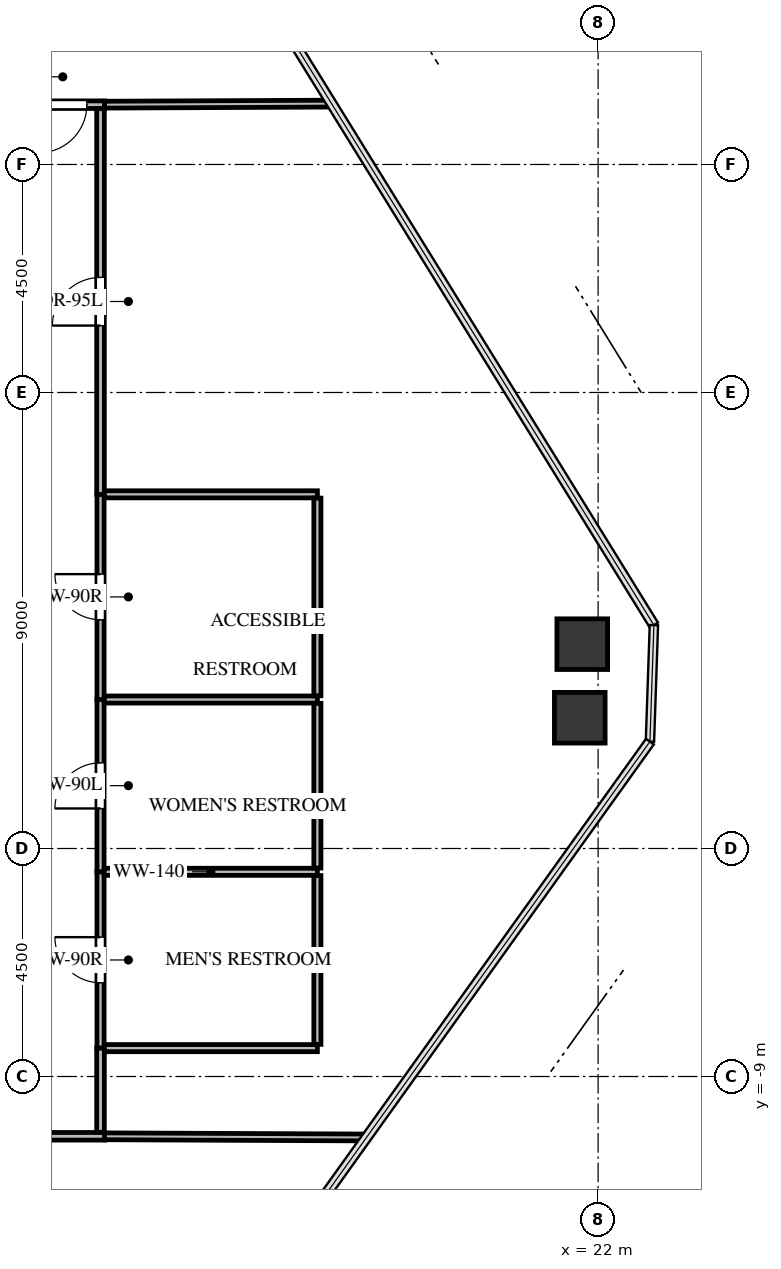
"""IFC4 building model, lengths in metres.
Left out: names, types, materials, properties, quantities, classifications, styles, units other than length and angle.
Written with IfcOpenShell. Run it as: python <this file> out.ifc"""

import sys

from ifc_helpers import new_model, si_unit, direction, frame, frame_2d, origin, origin_2d, place, context, subcontext, project, spatial, rectangle, extrude, source, transform, mapped, element, fill, save


model = new_model("IFC4")
c1 = context("Model", 3, precision=1e-05, world=origin(), true_north=direction((0.0, 1.0)))
c2 = subcontext(c1, "Body", "Model", "MODEL_VIEW")
j1 = project(units=[si_unit("LENGTHUNIT", "METRE"), si_unit("PLANEANGLEUNIT", "RADIAN")], contexts=[c1])
p1 = place(None, origin())
s1 = spatial("IfcSite", under=j1, at=p1, CompositionType="ELEMENT")
p2 = place(p1, origin())
s2 = spatial("IfcBuilding", under=s1, at=p2, CompositionType="ELEMENT")
p3 = place(p2, frame((0.0, 0.0, 183.7)))
s3 = spatial("IfcBuildingStorey", under=s2, at=p3, CompositionType="ELEMENT", Elevation=183.7)
m1 = source(origin(), c2, "Body", "SweptSolid", [
    extrude(rectangle(XDim=1.0, YDim=1.0, at=origin_2d()), origin(), (0.0, 0.0, 1.0), 3.3),
])
for number, where, z_axis, x_axis in (
    (1, (21.687, -0.467, -0.24), (0.0, 0.0, 1.0), (1.0, 0.0, 0.0)),
    (2, (21.638, -1.92, -0.24), (0.0, 0.0, 1.0), (1.0, 0.0, 0.0)),
):
    element("IfcColumn", number, at=place(p3, frame(where, z_axis=z_axis, x_axis=x_axis)), inside=s3, PredefinedType="COLUMN", context=c2, shape_type="MappedRepresentation", body=[
        mapped(m1, transform((0.0, 0.0, 0.0), x_axis=(1.0, 0.0, 0.0), y_axis=(0.0, 1.0, 0.0), z_axis=(0.0, 0.0, 1.0), scale=1.0)),
    ])
p4 = place(p3, frame((12.18, -8.44, 0.0), z_axis=(0.0, 0.0, 1.0), x_axis=(0.0, 1.0, 0.0)))
e3 = element("IfcWall", 3, at=p4, inside=s3, PredefinedType="PARTITIONING", context=c2, shape_type="SweptSolid", body=[
    extrude(rectangle(XDim=3.48, YDim=0.14, at=frame_2d((1.74, 0.0))), origin(), (0.0, 0.0, 1.0), 3.045),
])
p5 = place(p4, frame((1.29, 0.0, 0.0)))
e4 = element("IfcOpeningElement", 4, at=p5, cuts=e3, PredefinedType="OPENING", context=c2, shape_type="SweptSolid", body=[
    extrude(rectangle(XDim=0.9, YDim=2.05, at=frame_2d((0.45, 1.025))), frame((0.0, 0.08, 0.0), z_axis=(0.0, -1.0, 0.0), x_axis=(1.0, 0.0, 0.0)), (0.0, 0.0, 1.0), 0.16),
])
p6 = place(p3, frame((12.18, -4.96, 0.0), z_axis=(0.0, 0.0, 1.0), x_axis=(0.0, 1.0, 0.0)))
e5 = element("IfcWall", 5, at=p6, inside=s3, PredefinedType="PARTITIONING", context=c2, shape_type="SweptSolid", body=[
    extrude(rectangle(XDim=3.4, YDim=0.14, at=frame_2d((1.7, 0.0))), origin(), (0.0, 0.0, 1.0), 3.045),
])
p7 = place(p6, frame((1.25, 0.0, 0.0)))
e6 = element("IfcOpeningElement", 6, at=p7, cuts=e5, PredefinedType="OPENING", context=c2, shape_type="SweptSolid", body=[
    extrude(rectangle(XDim=0.9, YDim=2.05, at=frame_2d((0.45, 1.025))), frame((0.0, 0.08, 0.0), z_axis=(0.0, -1.0, 0.0), x_axis=(1.0, 0.0, 0.0)), (0.0, 0.0, 1.0), 0.16),
])
p8 = place(p3, frame((12.18, -1.56, 0.0), z_axis=(0.0, 0.0, 1.0), x_axis=(0.0, 1.0, 0.0)))
e7 = element("IfcWall", 7, at=p8, inside=s3, PredefinedType="PARTITIONING", context=c2, shape_type="SweptSolid", body=[
    extrude(rectangle(XDim=4.05, YDim=0.14, at=frame_2d((2.025, 0.0))), origin(), (0.0, 0.0, 1.0), 2.242),
])
p9 = place(p8, frame((1.575, 0.0, 0.0)))
e8 = element("IfcOpeningElement", 8, at=p9, cuts=e7, PredefinedType="OPENING", context=c2, shape_type="SweptSolid", body=[
    extrude(rectangle(XDim=0.9, YDim=2.05, at=frame_2d((0.45, 1.025))), frame((0.0, 0.08, 0.0), z_axis=(0.0, -1.0, 0.0), x_axis=(1.0, 0.0, 0.0)), (0.0, 0.0, 1.0), 0.16),
])
p10 = place(p3, frame((12.26, 10.18, 0.0), z_axis=(0.0, 0.0, 1.0), x_axis=(-1.0, 0.0, 0.0)))
e9 = element("IfcWall", 9, at=p10, inside=s3, PredefinedType="PARTITIONING", context=c2, shape_type="SweptSolid", body=[
    extrude(rectangle(XDim=6.72, YDim=0.15, at=frame_2d((3.36, 0.0))), origin(), (0.0, 0.0, 1.0), 2.242),
])
p11 = place(p10, frame((0.35, 0.0, 0.0)))
e10 = element("IfcOpeningElement", 10, at=p11, cuts=e9, PredefinedType="OPENING", context=c2, shape_type="SweptSolid", body=[
    extrude(rectangle(XDim=0.95, YDim=2.1, at=frame_2d((0.475, 1.05))), frame((0.0, 0.085, 0.0), z_axis=(0.0, -1.0, 0.0), x_axis=(1.0, 0.0, 0.0)), (0.0, 0.0, 1.0), 0.17),
])
p12 = place(p3, frame((4.04, -10.18, 0.0), z_axis=(0.0, 0.0, 1.0), x_axis=(1.0, 0.0, 0.0)))
e11 = element("IfcWall", 11, at=p12, inside=s3, PredefinedType="PARTITIONING", context=c2, shape_type="SweptSolid", body=[
    extrude(rectangle(XDim=8.22, YDim=0.15, at=frame_2d((4.11, 0.0))), origin(), (0.0, 0.0, 1.0), 2.242),
])
p13 = place(p12, frame((3.65, 0.0, 0.0)))
e12 = element("IfcOpeningElement", 12, at=p13, cuts=e11, PredefinedType="OPENING", context=c2, shape_type="SweptSolid", body=[
    extrude(rectangle(XDim=0.92, YDim=2.1, at=frame_2d((0.46, 1.05))), frame((0.0, 0.085, 0.0), z_axis=(0.0, -1.0, 0.0), x_axis=(1.0, 0.0, 0.0)), (0.0, 0.0, 1.0), 0.17),
])
p14 = place(p3, frame((12.18, 2.49, 0.0), z_axis=(0.0, 0.0, 1.0), x_axis=(0.0, 1.0, 0.0)))
e13 = element("IfcWall", 13, at=p14, inside=s3, PredefinedType="PARTITIONING", context=c2, shape_type="SweptSolid", body=[
    extrude(rectangle(XDim=7.611, YDim=0.15, at=frame_2d((3.806, 0.0))), origin(), (0.0, 0.0, 1.0), 3.045),
])
p15 = place(p14, frame((3.331, 0.0, 0.0)))
e14 = element("IfcOpeningElement", 14, at=p15, cuts=e13, PredefinedType="OPENING", context=c2, shape_type="SweptSolid", body=[
    extrude(rectangle(XDim=0.95, YDim=2.1, at=frame_2d((0.475, 1.05))), frame((0.0, 0.085, 0.0), z_axis=(0.0, -1.0, 0.0), x_axis=(1.0, 0.0, 0.0)), (0.0, 0.0, 1.0), 0.17),
])
p16 = place(p3, frame((12.18, -10.101, 0.0), z_axis=(0.0, 0.0, 1.0), x_axis=(0.0, 1.0, 0.0)))
e15 = element("IfcWall", 15, at=p16, inside=s3, PredefinedType="PARTITIONING", context=c2, shape_type="SweptSolid", body=[
    extrude(rectangle(XDim=1.661, YDim=0.15, at=frame_2d((0.831, 0.0))), origin(), (0.0, 0.0, 1.0), 3.045),
])
p17 = place(p3, frame((12.254, -4.96, 0.0), z_axis=(0.0, 0.0, 1.0), x_axis=(1.0, 0.0, 0.0)))
e16 = element("IfcWall", 16, at=p17, inside=s3, PredefinedType="PARTITIONING", context=c2, shape_type="SweptSolid", body=[
    extrude(rectangle(XDim=4.206, YDim=0.14, at=frame_2d((2.103, 0.0))), origin(), (0.0, 0.0, 1.0), 3.045),
])
p18 = place(p3, frame((16.46, -8.44, 0.0), z_axis=(0.0, 0.0, 1.0), x_axis=(-1.0, 0.0, 0.0)))
e17 = element("IfcWall", 17, at=p18, inside=s3, PredefinedType="PARTITIONING", context=c2, shape_type="SweptSolid", body=[
    extrude(rectangle(XDim=4.201, YDim=0.14, at=frame_2d((2.101, 0.0))), origin(), (0.0, 0.0, 1.0), 3.045),
])
p19 = place(p3, frame((16.46, -5.034, 0.0), z_axis=(0.0, 0.0, 1.0), x_axis=(0.0, -1.0, 0.0)))
e18 = element("IfcWall", 18, at=p19, inside=s3, PredefinedType="PARTITIONING", context=c2, shape_type="SweptSolid", body=[
    extrude(rectangle(XDim=3.332, YDim=0.14, at=frame_2d((1.666, 0.0))), origin(), (0.0, 0.0, 1.0), 3.045),
])
p20 = place(p3, frame((12.254, -1.56, 0.0), z_axis=(0.0, 0.0, 1.0), x_axis=(1.0, 0.0, 0.0)))
e19 = element("IfcWall", 19, at=p20, inside=s3, PredefinedType="PARTITIONING", context=c2, shape_type="SweptSolid", body=[
    extrude(rectangle(XDim=4.206, YDim=0.14, at=frame_2d((2.103, 0.0))), origin(), (0.0, 0.0, 1.0), 3.045),
])
p21 = place(p3, frame((16.46, -1.634, 0.0), z_axis=(0.0, 0.0, 1.0), x_axis=(0.0, -1.0, 0.0)))
e20 = element("IfcWall", 20, at=p21, inside=s3, PredefinedType="PARTITIONING", context=c2, shape_type="SweptSolid", body=[
    extrude(rectangle(XDim=3.252, YDim=0.14, at=frame_2d((1.626, 0.0))), origin(), (0.0, 0.0, 1.0), 3.045),
])
p22 = place(p3, frame((12.259, 2.49, 0.0), z_axis=(0.0, 0.0, 1.0), x_axis=(1.0, 0.0, 0.0)))
e21 = element("IfcWall", 21, at=p22, inside=s3, PredefinedType="PARTITIONING", context=c2, shape_type="SweptSolid", body=[
    extrude(rectangle(XDim=4.201, YDim=0.14, at=frame_2d((2.101, 0.0))), origin(), (0.0, 0.0, 1.0), 3.045),
])
p23 = place(p3, frame((16.46, 2.416, 0.0), z_axis=(0.0, 0.0, 1.0), x_axis=(0.0, -1.0, 0.0)))
e22 = element("IfcWall", 22, at=p23, inside=s3, PredefinedType="PARTITIONING", context=c2, shape_type="SweptSolid", body=[
    extrude(rectangle(XDim=3.902, YDim=0.14, at=frame_2d((1.951, 0.0))), origin(), (0.0, 0.0, 1.0), 2.242),
])
p24 = place(p3, frame((16.74, 10.201, 0.0), z_axis=(0.0, 0.0, 1.0), x_axis=(-0.999989522694, -0.004577608714, 0.0)))
e23 = element("IfcWall", 23, at=p24, inside=s3, PredefinedType="PARTITIONING", context=c2, shape_type="SweptSolid", body=[
    extrude(rectangle(XDim=4.48, YDim=0.135, at=frame_2d((2.24, 0.0))), origin(), (0.0, 0.0, 1.0), 2.399),
])
p25 = place(p3, frame((12.26, -10.18, 0.0), z_axis=(0.0, 0.0, 1.0), x_axis=(0.999990144117, -0.004439782427, 0.0)))
e24 = element("IfcWall", 24, at=p25, inside=s3, PredefinedType="PARTITIONING", context=c2, shape_type="SweptSolid", body=[
    extrude(rectangle(XDim=5.169, YDim=0.135, at=frame_2d((2.584, 0.0))), origin(), (0.0, 0.0, 1.0), 2.399),
])
m2 = source(origin(), c2, "Body", "SweptSolid", [
    extrude(rectangle(XDim=0.9, YDim=2.05, at=frame_2d((0.45, 1.025))), frame((0.0, 0.025, 0.0), z_axis=(0.0, -1.0, 0.0), x_axis=(1.0, 0.0, 0.0)), (0.0, 0.0, 1.0), 0.05),
])
p26 = place(p5, origin())
e25 = element("IfcDoor", 25, at=p26, inside=s3, OperationType="SINGLE_SWING_RIGHT", PredefinedType="DOOR", context=c2, shape_type="MappedRepresentation", body=[
    mapped(m2, transform((0.0, 0.0, 0.0), x_axis=(1.0, 0.0, 0.0), y_axis=(0.0, 1.0, 0.0), z_axis=(0.0, 0.0, 1.0), scale=1.0)),
])
fill(e4, e25)
m3 = source(origin(), c2, "Body", "SweptSolid", [
    extrude(rectangle(XDim=0.9, YDim=2.05, at=frame_2d((0.45, 1.025))), frame((0.0, 0.025, 0.0), z_axis=(0.0, -1.0, 0.0), x_axis=(1.0, 0.0, 0.0)), (0.0, 0.0, 1.0), 0.05),
])
p27 = place(p7, origin())
e26 = element("IfcDoor", 26, at=p27, inside=s3, OperationType="SINGLE_SWING_LEFT", PredefinedType="DOOR", context=c2, shape_type="MappedRepresentation", body=[
    mapped(m3, transform((0.0, 0.0, 0.0), x_axis=(1.0, 0.0, 0.0), y_axis=(0.0, 1.0, 0.0), z_axis=(0.0, 0.0, 1.0), scale=1.0)),
])
fill(e6, e26)
p28 = place(p9, origin())
e27 = element("IfcDoor", 27, at=p28, inside=s3, OperationType="SINGLE_SWING_RIGHT", PredefinedType="DOOR", context=c2, shape_type="MappedRepresentation", body=[
    mapped(m2, transform((0.0, 0.0, 0.0), x_axis=(1.0, 0.0, 0.0), y_axis=(0.0, 1.0, 0.0), z_axis=(0.0, 0.0, 1.0), scale=1.0)),
])
fill(e8, e27)
m4 = source(origin(), c2, "Body", "SweptSolid", [
    extrude(rectangle(XDim=0.95, YDim=2.1, at=frame_2d((0.475, 1.05))), frame((0.0, 0.025, 0.0), z_axis=(0.0, -1.0, 0.0), x_axis=(1.0, 0.0, 0.0)), (0.0, 0.0, 1.0), 0.05),
])
p29 = place(p11, origin())
e28 = element("IfcDoor", 28, at=p29, inside=s3, OperationType="SINGLE_SWING_RIGHT", PredefinedType="DOOR", context=c2, shape_type="MappedRepresentation", body=[
    mapped(m4, transform((0.0, 0.0, 0.0), x_axis=(1.0, 0.0, 0.0), y_axis=(0.0, 1.0, 0.0), z_axis=(0.0, 0.0, 1.0), scale=1.0)),
])
fill(e10, e28)
m5 = source(origin(), c2, "Body", "SweptSolid", [
    extrude(rectangle(XDim=0.95, YDim=2.1, at=frame_2d((0.475, 1.05))), frame((0.0, 0.025, 0.0), z_axis=(0.0, -1.0, 0.0), x_axis=(1.0, 0.0, 0.0)), (0.0, 0.0, 1.0), 0.05),
])
p30 = place(p15, origin())
e29 = element("IfcDoor", 29, at=p30, inside=s3, OperationType="SINGLE_SWING_LEFT", PredefinedType="DOOR", context=c2, shape_type="MappedRepresentation", body=[
    mapped(m5, transform((0.0, 0.0, 0.0), x_axis=(1.0, 0.0, 0.0), y_axis=(0.0, 1.0, 0.0), z_axis=(0.0, 0.0, 1.0), scale=1.0)),
])
fill(e14, e29)
save(model, sys.argv[1])
